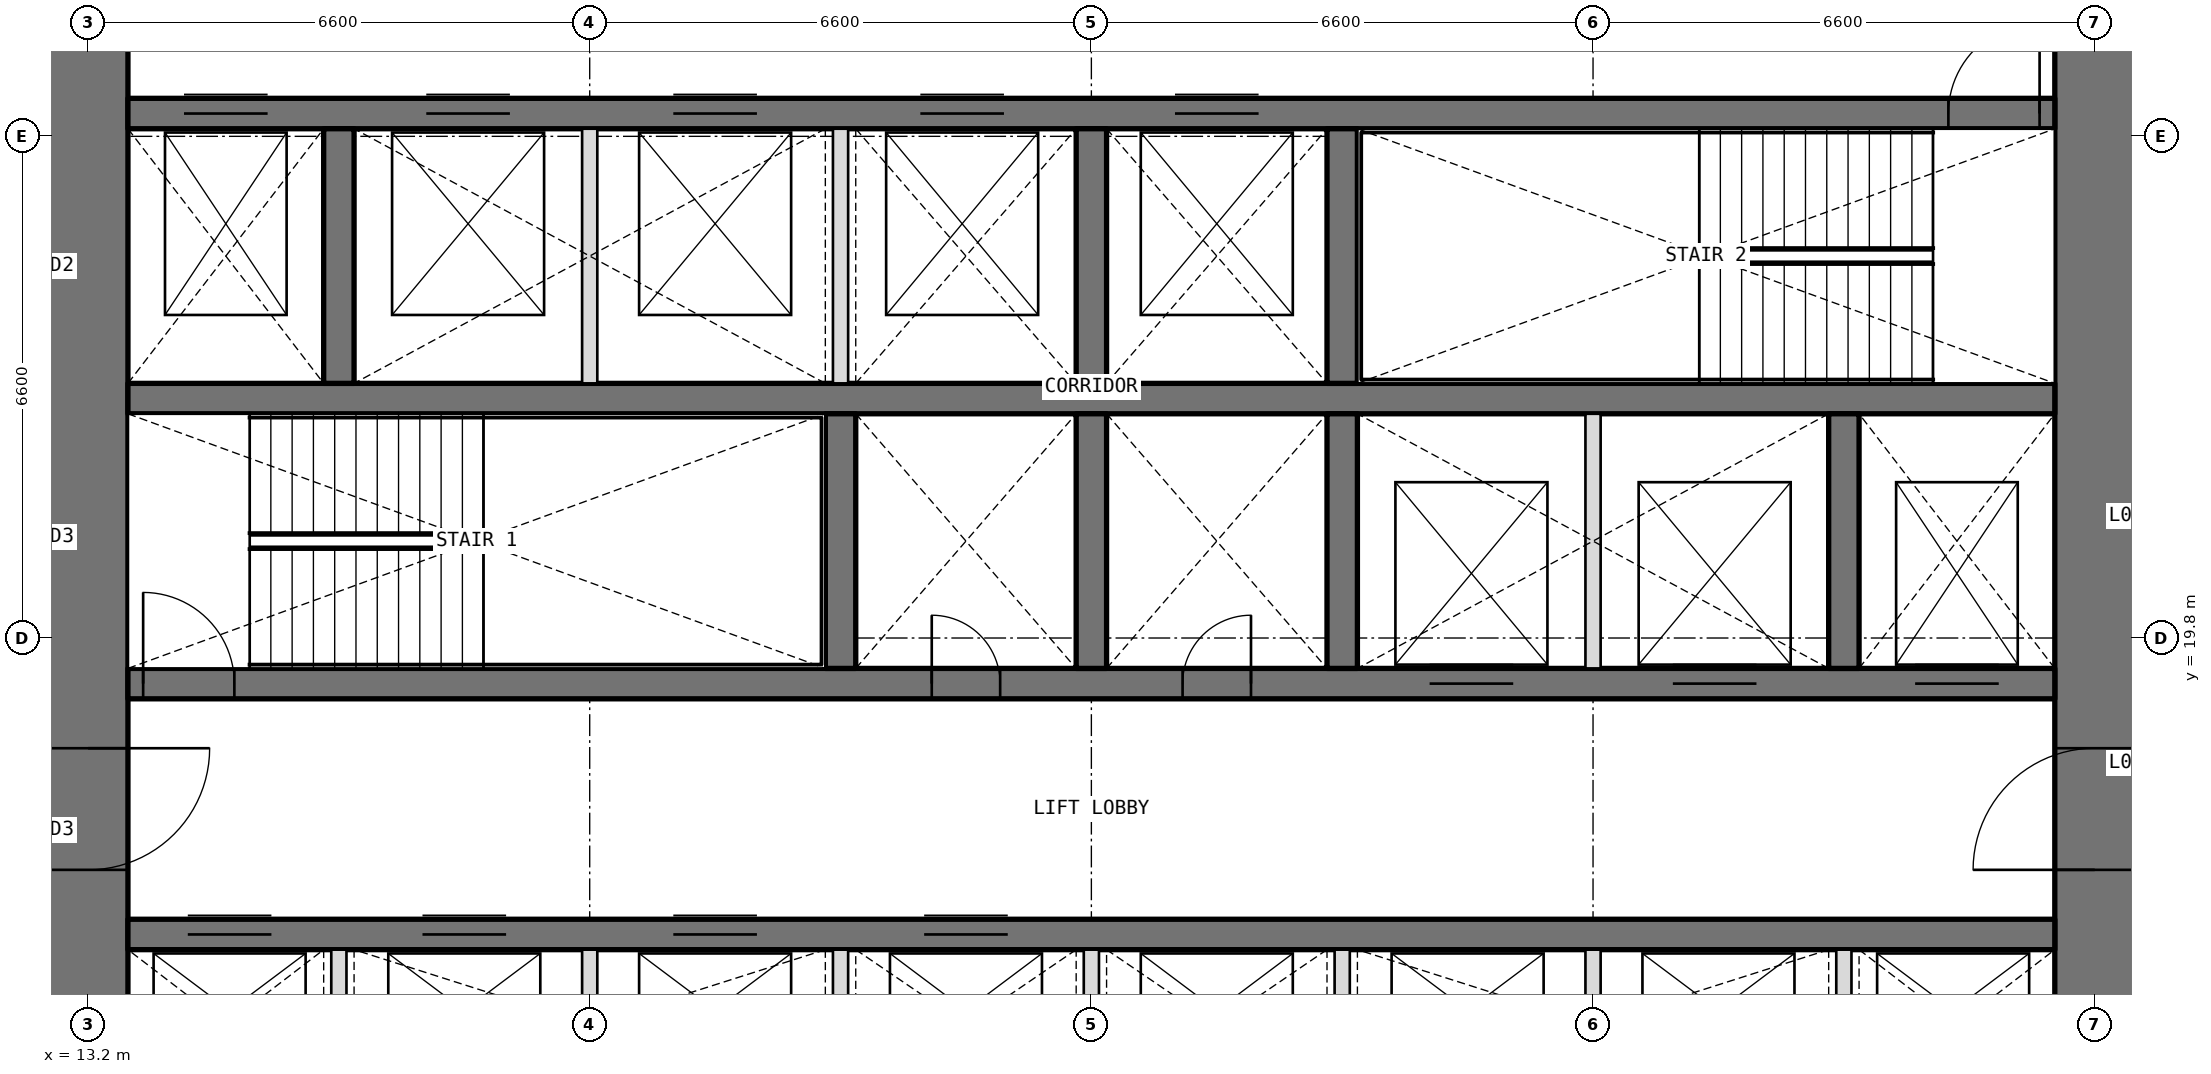
"""IFC4 building model, lengths in metres.
Left out: names, types, materials, properties, quantities, classifications, styles, units other than length and angle.
Written with IfcOpenShell. Run it as: python <this file> out.ifc"""

import sys

from ifc_helpers import new_model, si_unit, direction, frame, frame_2d, origin, place, context, subcontext, project, spatial, rectangle, extrude, element, fill, save


model = new_model("IFC4")
c1 = context("Model", 3, precision=1e-05, world=origin(), true_north=direction((0.0, 1.0)))
c2 = subcontext(c1, "Body", "Model", "MODEL_VIEW")
j1 = project(units=[si_unit("LENGTHUNIT", "METRE"), si_unit("PLANEANGLEUNIT", "RADIAN")], contexts=[c1])
p1 = place(None, origin())
s1 = spatial("IfcSite", under=j1, at=p1, CompositionType="ELEMENT")
p2 = place(p1, origin())
s2 = spatial("IfcBuilding", under=s1, at=p2, CompositionType="ELEMENT")
p3 = place(p2, frame((0.0, 0.0, 33.9)))
s3 = spatial("IfcBuildingStorey", under=s2, at=p3, CompositionType="ELEMENT", Elevation=33.9)
p4 = place(p3, frame((39.6, 13.725, 0.0), z_axis=(0.0, 0.0, 1.0), x_axis=(0.0, 1.0, 0.0)))
e1 = element("IfcWall", 1, at=p4, inside=s3, PredefinedType="SHEAR", context=c2, shape_type="SweptSolid", body=[
    extrude(rectangle(XDim=18.75, YDim=1.05, at=frame_2d((9.375, 0.0))), origin(), (0.0, 0.0, 1.0), 4.2),
])
p5 = place(p4, frame((3.025, 0.0, 0.0)))
e2 = element("IfcOpeningElement", 2, at=p5, cuts=e1, PredefinedType="OPENING", context=c2, shape_type="SweptSolid", body=[
    extrude(rectangle(XDim=1.6, YDim=2.1, at=frame_2d((0.8, 1.05))), frame((0.0, 0.535, 0.0), z_axis=(0.0, -1.0, 0.0), x_axis=(1.0, 0.0, 0.0)), (0.0, 0.0, 1.0), 1.07),
])
p6 = place(p4, frame((13.825, 0.0, 0.0)))
e3 = element("IfcOpeningElement", 3, at=p6, cuts=e1, PredefinedType="OPENING", context=c2, shape_type="SweptSolid", body=[
    extrude(rectangle(XDim=1.6, YDim=2.1, at=frame_2d((0.8, 1.05))), frame((0.0, 0.535, 0.0), z_axis=(0.0, -1.0, 0.0), x_axis=(1.0, 0.0, 0.0)), (0.0, 0.0, 1.0), 1.07),
])
p7 = place(p3, frame((13.2, 32.475, 0.0), z_axis=(0.0, 0.0, 1.0), x_axis=(0.0, -1.0, 0.0)))
e4 = element("IfcWall", 4, at=p7, inside=s3, PredefinedType="SHEAR", context=c2, shape_type="SweptSolid", body=[
    extrude(rectangle(XDim=18.75, YDim=1.05, at=frame_2d((9.375, 0.0))), origin(), (0.0, 0.0, 1.0), 4.2),
])
p8 = place(p7, frame((14.125, 0.0, 0.0)))
e5 = element("IfcOpeningElement", 5, at=p8, cuts=e4, PredefinedType="OPENING", context=c2, shape_type="SweptSolid", body=[
    extrude(rectangle(XDim=1.6, YDim=2.1, at=frame_2d((0.8, 1.05))), frame((0.0, 0.535, 0.0), z_axis=(0.0, -1.0, 0.0), x_axis=(1.0, 0.0, 0.0)), (0.0, 0.0, 1.0), 1.07),
])
p9 = place(p7, frame((3.325, 0.0, 0.0)))
e6 = element("IfcOpeningElement", 6, at=p9, cuts=e4, PredefinedType="OPENING", context=c2, shape_type="SweptSolid", body=[
    extrude(rectangle(XDim=1.6, YDim=2.1, at=frame_2d((0.8, 1.05))), frame((0.0, 0.535, 0.0), z_axis=(0.0, -1.0, 0.0), x_axis=(1.0, 0.0, 0.0)), (0.0, 0.0, 1.0), 1.07),
])
p10 = place(p3, frame((13.725, 15.9, 0.0), z_axis=(0.0, 0.0, 1.0), x_axis=(1.0, 0.0, 0.0)))
e7 = element("IfcWall", 7, at=p10, inside=s3, PredefinedType="SHEAR", context=c2, shape_type="SweptSolid", body=[
    extrude(rectangle(XDim=25.35, YDim=0.4, at=frame_2d((12.675, 0.0))), origin(), (0.0, 0.0, 1.0), 4.2),
])
p11 = place(p10, frame((0.788, 0.0, 0.0)))
e8 = element("IfcOpeningElement", 8, at=p11, cuts=e7, PredefinedType="OPENING", context=c2, shape_type="SweptSolid", body=[
    extrude(rectangle(XDim=1.1, YDim=2.1, at=frame_2d((0.55, 1.05))), frame((0.0, 0.21, 0.0), z_axis=(0.0, -1.0, 0.0), x_axis=(1.0, 0.0, 0.0)), (0.0, 0.0, 1.0), 0.42),
])
p12 = place(p10, frame((3.875, 0.0, 0.0)))
e9 = element("IfcOpeningElement", 9, at=p12, cuts=e7, PredefinedType="OPENING", context=c2, shape_type="SweptSolid", body=[
    extrude(rectangle(XDim=1.1, YDim=2.1, at=frame_2d((0.55, 1.05))), frame((0.0, 0.21, 0.0), z_axis=(0.0, -1.0, 0.0), x_axis=(1.0, 0.0, 0.0)), (0.0, 0.0, 1.0), 0.42),
])
p13 = place(p10, frame((7.175, 0.0, 0.0)))
e10 = element("IfcOpeningElement", 10, at=p13, cuts=e7, PredefinedType="OPENING", context=c2, shape_type="SweptSolid", body=[
    extrude(rectangle(XDim=1.1, YDim=2.1, at=frame_2d((0.55, 1.05))), frame((0.0, 0.21, 0.0), z_axis=(0.0, -1.0, 0.0), x_axis=(1.0, 0.0, 0.0)), (0.0, 0.0, 1.0), 0.42),
])
p14 = place(p10, frame((10.475, 0.0, 0.0)))
e11 = element("IfcOpeningElement", 11, at=p14, cuts=e7, PredefinedType="OPENING", context=c2, shape_type="SweptSolid", body=[
    extrude(rectangle(XDim=1.1, YDim=2.1, at=frame_2d((0.55, 1.05))), frame((0.0, 0.21, 0.0), z_axis=(0.0, -1.0, 0.0), x_axis=(1.0, 0.0, 0.0)), (0.0, 0.0, 1.0), 0.42),
])
p15 = place(p3, frame((13.725, 19.2, 0.0), z_axis=(0.0, 0.0, 1.0), x_axis=(1.0, 0.0, 0.0)))
e12 = element("IfcWall", 12, at=p15, inside=s3, PredefinedType="SHEAR", context=c2, shape_type="SweptSolid", body=[
    extrude(rectangle(XDim=25.35, YDim=0.4, at=frame_2d((12.675, 0.0))), origin(), (0.0, 0.0, 1.0), 4.2),
])
p16 = place(p15, frame((10.575, 0.0, 0.0)))
e13 = element("IfcOpeningElement", 13, at=p16, cuts=e12, PredefinedType="OPENING", context=c2, shape_type="SweptSolid", body=[
    extrude(rectangle(XDim=0.9, YDim=2.1, at=frame_2d((0.45, 1.05))), frame((0.0, 0.21, 0.0), z_axis=(0.0, -1.0, 0.0), x_axis=(1.0, 0.0, 0.0)), (0.0, 0.0, 1.0), 0.42),
])
p17 = place(p15, frame((13.875, 0.0, 0.0)))
e14 = element("IfcOpeningElement", 14, at=p17, cuts=e12, PredefinedType="OPENING", context=c2, shape_type="SweptSolid", body=[
    extrude(rectangle(XDim=0.9, YDim=2.1, at=frame_2d((0.45, 1.05))), frame((0.0, 0.21, 0.0), z_axis=(0.0, -1.0, 0.0), x_axis=(1.0, 0.0, 0.0)), (0.0, 0.0, 1.0), 0.42),
])
p18 = place(p15, frame((0.2, 0.0, 0.0)))
e15 = element("IfcOpeningElement", 15, at=p18, cuts=e12, PredefinedType="OPENING", context=c2, shape_type="SweptSolid", body=[
    extrude(rectangle(XDim=1.2, YDim=2.1, at=frame_2d((0.6, 1.05))), frame((0.0, 0.21, 0.0), z_axis=(0.0, -1.0, 0.0), x_axis=(1.0, 0.0, 0.0)), (0.0, 0.0, 1.0), 0.42),
])
p19 = place(p15, frame((23.512, 0.0, 0.0)))
e16 = element("IfcOpeningElement", 16, at=p19, cuts=e12, PredefinedType="OPENING", context=c2, shape_type="SweptSolid", body=[
    extrude(rectangle(XDim=1.1, YDim=2.1, at=frame_2d((0.55, 1.05))), frame((0.0, 0.21, 0.0), z_axis=(0.0, -1.0, 0.0), x_axis=(1.0, 0.0, 0.0)), (0.0, 0.0, 1.0), 0.42),
])
p20 = place(p15, frame((17.125, 0.0, 0.0)))
e17 = element("IfcOpeningElement", 17, at=p20, cuts=e12, PredefinedType="OPENING", context=c2, shape_type="SweptSolid", body=[
    extrude(rectangle(XDim=1.1, YDim=2.1, at=frame_2d((0.55, 1.05))), frame((0.0, 0.21, 0.0), z_axis=(0.0, -1.0, 0.0), x_axis=(1.0, 0.0, 0.0)), (0.0, 0.0, 1.0), 0.42),
])
p21 = place(p15, frame((20.325, 0.0, 0.0)))
e18 = element("IfcOpeningElement", 18, at=p21, cuts=e12, PredefinedType="OPENING", context=c2, shape_type="SweptSolid", body=[
    extrude(rectangle(XDim=1.1, YDim=2.1, at=frame_2d((0.55, 1.05))), frame((0.0, 0.21, 0.0), z_axis=(0.0, -1.0, 0.0), x_axis=(1.0, 0.0, 0.0)), (0.0, 0.0, 1.0), 0.42),
])
p22 = place(p3, frame((13.725, 22.95, 0.0), z_axis=(0.0, 0.0, 1.0), x_axis=(1.0, 0.0, 0.0)))
e19 = element("IfcWall", 19, at=p22, inside=s3, PredefinedType="SHEAR", context=c2, shape_type="SweptSolid", body=[
    extrude(rectangle(XDim=25.35, YDim=0.4, at=frame_2d((12.675, 0.0))), origin(), (0.0, 0.0, 1.0), 4.2),
])
p23 = place(p3, frame((13.725, 26.7, 0.0), z_axis=(0.0, 0.0, 1.0), x_axis=(1.0, 0.0, 0.0)))
e20 = element("IfcWall", 20, at=p23, inside=s3, PredefinedType="SHEAR", context=c2, shape_type="SweptSolid", body=[
    extrude(rectangle(XDim=25.35, YDim=0.4, at=frame_2d((12.675, 0.0))), origin(), (0.0, 0.0, 1.0), 4.2),
])
p24 = place(p23, frame((23.95, 0.0, 0.0)))
e21 = element("IfcOpeningElement", 21, at=p24, cuts=e20, PredefinedType="OPENING", context=c2, shape_type="SweptSolid", body=[
    extrude(rectangle(XDim=1.2, YDim=2.1, at=frame_2d((0.6, 1.05))), frame((0.0, 0.21, 0.0), z_axis=(0.0, -1.0, 0.0), x_axis=(1.0, 0.0, 0.0)), (0.0, 0.0, 1.0), 0.42),
])
p25 = place(p23, frame((0.738, 0.0, 0.0)))
e22 = element("IfcOpeningElement", 22, at=p25, cuts=e20, PredefinedType="OPENING", context=c2, shape_type="SweptSolid", body=[
    extrude(rectangle(XDim=1.1, YDim=2.1, at=frame_2d((0.55, 1.05))), frame((0.0, 0.21, 0.0), z_axis=(0.0, -1.0, 0.0), x_axis=(1.0, 0.0, 0.0)), (0.0, 0.0, 1.0), 0.42),
])
p26 = place(p23, frame((3.925, 0.0, 0.0)))
e23 = element("IfcOpeningElement", 23, at=p26, cuts=e20, PredefinedType="OPENING", context=c2, shape_type="SweptSolid", body=[
    extrude(rectangle(XDim=1.1, YDim=2.1, at=frame_2d((0.55, 1.05))), frame((0.0, 0.21, 0.0), z_axis=(0.0, -1.0, 0.0), x_axis=(1.0, 0.0, 0.0)), (0.0, 0.0, 1.0), 0.42),
])
p27 = place(p23, frame((7.175, 0.0, 0.0)))
e24 = element("IfcOpeningElement", 24, at=p27, cuts=e20, PredefinedType="OPENING", context=c2, shape_type="SweptSolid", body=[
    extrude(rectangle(XDim=1.1, YDim=2.1, at=frame_2d((0.55, 1.05))), frame((0.0, 0.21, 0.0), z_axis=(0.0, -1.0, 0.0), x_axis=(1.0, 0.0, 0.0)), (0.0, 0.0, 1.0), 0.42),
])
p28 = place(p23, frame((10.425, 0.0, 0.0)))
e25 = element("IfcOpeningElement", 25, at=p28, cuts=e20, PredefinedType="OPENING", context=c2, shape_type="SweptSolid", body=[
    extrude(rectangle(XDim=1.1, YDim=2.1, at=frame_2d((0.55, 1.05))), frame((0.0, 0.21, 0.0), z_axis=(0.0, -1.0, 0.0), x_axis=(1.0, 0.0, 0.0)), (0.0, 0.0, 1.0), 0.42),
])
p29 = place(p23, frame((13.775, 0.0, 0.0)))
e26 = element("IfcOpeningElement", 26, at=p29, cuts=e20, PredefinedType="OPENING", context=c2, shape_type="SweptSolid", body=[
    extrude(rectangle(XDim=1.1, YDim=2.1, at=frame_2d((0.55, 1.05))), frame((0.0, 0.21, 0.0), z_axis=(0.0, -1.0, 0.0), x_axis=(1.0, 0.0, 0.0)), (0.0, 0.0, 1.0), 0.42),
])
for number, where, z_axis, x_axis in (
    (27, (23.1, 19.4, 0.0), (0.0, 0.0, 1.0), (0.0, 1.0, 0.0)),
    (28, (26.4, 19.4, 0.0), (0.0, 0.0, 1.0), (0.0, 1.0, 0.0)),
    (29, (29.7, 19.4, 0.0), (0.0, 0.0, 1.0), (0.0, 1.0, 0.0)),
    (30, (36.3, 19.4, 0.0), (0.0, 0.0, 1.0), (0.0, 1.0, 0.0)),
    (31, (16.5, 23.15, 0.0), (0.0, 0.0, 1.0), (0.0, 1.0, 0.0)),
    (32, (26.4, 23.15, 0.0), (0.0, 0.0, 1.0), (0.0, 1.0, 0.0)),
    (33, (29.7, 23.15, 0.0), (0.0, 0.0, 1.0), (0.0, 1.0, 0.0)),
):
    element("IfcWall", number, at=place(p3, frame(where, z_axis=z_axis, x_axis=x_axis)), inside=s3, PredefinedType="SHEAR", context=c2, shape_type="SweptSolid", body=[
        extrude(rectangle(XDim=3.35, YDim=0.4, at=frame_2d((1.675, 0.0))), origin(), (0.0, 0.0, 1.0), 4.2),
    ])
for number, where, z_axis, x_axis in (
    (34, (16.5, 13.725, 0.0), (0.0, 0.0, 1.0), (0.0, 1.0, 0.0)),
    (35, (19.8, 13.725, 0.0), (0.0, 0.0, 1.0), (0.0, 1.0, 0.0)),
    (36, (23.1, 13.725, 0.0), (0.0, 0.0, 1.0), (0.0, 1.0, 0.0)),
    (37, (26.4, 13.725, 0.0), (0.0, 0.0, 1.0), (0.0, 1.0, 0.0)),
    (38, (29.7, 13.725, 0.0), (0.0, 0.0, 1.0), (0.0, 1.0, 0.0)),
    (39, (33.0, 13.725, 0.0), (0.0, 0.0, 1.0), (0.0, 1.0, 0.0)),
    (40, (36.3, 13.725, 0.0), (0.0, 0.0, 1.0), (0.0, 1.0, 0.0)),
):
    element("IfcWall", number, at=place(p3, frame(where, z_axis=z_axis, x_axis=x_axis)), inside=s3, PredefinedType="PARTITIONING", context=c2, shape_type="SweptSolid", body=[
        extrude(rectangle(XDim=1.975, YDim=0.2, at=frame_2d((0.987, 0.0))), origin(), (0.0, 0.0, 1.0), 4.2),
    ])
for number, where, z_axis, x_axis in (
    (41, (33.0, 19.4, 0.0), (0.0, 0.0, 1.0), (0.0, 1.0, 0.0)),
    (42, (19.8, 23.15, 0.0), (0.0, 0.0, 1.0), (0.0, 1.0, 0.0)),
    (43, (23.1, 23.15, 0.0), (0.0, 0.0, 1.0), (0.0, 1.0, 0.0)),
):
    element("IfcWall", number, at=place(p3, frame(where, z_axis=z_axis, x_axis=x_axis)), inside=s3, PredefinedType="PARTITIONING", context=c2, shape_type="SweptSolid", body=[
        extrude(rectangle(XDim=3.35, YDim=0.2, at=frame_2d((1.675, 0.0))), origin(), (0.0, 0.0, 1.0), 4.2),
    ])
p30 = place(p16, origin())
e44 = element("IfcDoor", 44, at=p30, inside=s3, OperationType="SINGLE_SWING_LEFT", PredefinedType="DOOR", context=c2, shape_type="SweptSolid", body=[
    extrude(rectangle(XDim=0.9, YDim=2.1, at=frame_2d((0.45, 1.05))), frame((0.0, 0.025, 0.0), z_axis=(0.0, -1.0, 0.0), x_axis=(1.0, 0.0, 0.0)), (0.0, 0.0, 1.0), 0.05),
])
fill(e13, e44)
p31 = place(p17, origin())
e45 = element("IfcDoor", 45, at=p31, inside=s3, OperationType="SINGLE_SWING_RIGHT", PredefinedType="DOOR", context=c2, shape_type="SweptSolid", body=[
    extrude(rectangle(XDim=0.9, YDim=2.1, at=frame_2d((0.45, 1.05))), frame((0.0, 0.025, 0.0), z_axis=(0.0, -1.0, 0.0), x_axis=(1.0, 0.0, 0.0)), (0.0, 0.0, 1.0), 0.05),
])
fill(e14, e45)
p32 = place(p18, origin())
e46 = element("IfcDoor", 46, at=p32, inside=s3, OperationType="SINGLE_SWING_LEFT", PredefinedType="DOOR", context=c2, shape_type="SweptSolid", body=[
    extrude(rectangle(XDim=1.2, YDim=2.1, at=frame_2d((0.6, 1.05))), frame((0.0, 0.025, 0.0), z_axis=(0.0, -1.0, 0.0), x_axis=(1.0, 0.0, 0.0)), (0.0, 0.0, 1.0), 0.05),
])
fill(e15, e46)
p33 = place(p24, origin())
e47 = element("IfcDoor", 47, at=p33, inside=s3, OperationType="SINGLE_SWING_RIGHT", PredefinedType="DOOR", context=c2, shape_type="SweptSolid", body=[
    extrude(rectangle(XDim=1.2, YDim=2.1, at=frame_2d((0.6, 1.05))), frame((0.0, 0.025, 0.0), z_axis=(0.0, -1.0, 0.0), x_axis=(1.0, 0.0, 0.0)), (0.0, 0.0, 1.0), 0.05),
])
fill(e21, e47)
p34 = place(p8, origin())
e48 = element("IfcDoor", 48, at=p34, inside=s3, OperationType="DOUBLE_DOOR_DOUBLE_SWING", PredefinedType="DOOR", context=c2, shape_type="SweptSolid", body=[
    extrude(rectangle(XDim=1.6, YDim=2.1, at=frame_2d((0.8, 1.05))), frame((0.0, 0.025, 0.0), z_axis=(0.0, -1.0, 0.0), x_axis=(1.0, 0.0, 0.0)), (0.0, 0.0, 1.0), 0.05),
])
fill(e5, e48)
p35 = place(p5, origin())
e49 = element("IfcDoor", 49, at=p35, inside=s3, OperationType="DOUBLE_DOOR_DOUBLE_SWING", PredefinedType="DOOR", context=c2, shape_type="SweptSolid", body=[
    extrude(rectangle(XDim=1.6, YDim=2.1, at=frame_2d((0.8, 1.05))), frame((0.0, 0.025, 0.0), z_axis=(0.0, -1.0, 0.0), x_axis=(1.0, 0.0, 0.0)), (0.0, 0.0, 1.0), 0.05),
])
fill(e2, e49)
p36 = place(p11, origin())
e50 = element("IfcDoor", 50, at=p36, inside=s3, OperationType="DOUBLE_DOOR_SLIDING", PredefinedType="DOOR", context=c2, shape_type="SweptSolid", body=[
    extrude(rectangle(XDim=1.1, YDim=2.1, at=frame_2d((0.55, 1.05))), frame((0.0, 0.025, 0.0), z_axis=(0.0, -1.0, 0.0), x_axis=(1.0, 0.0, 0.0)), (0.0, 0.0, 1.0), 0.05),
])
fill(e8, e50)
p37 = place(p12, origin())
e51 = element("IfcDoor", 51, at=p37, inside=s3, OperationType="DOUBLE_DOOR_SLIDING", PredefinedType="DOOR", context=c2, shape_type="SweptSolid", body=[
    extrude(rectangle(XDim=1.1, YDim=2.1, at=frame_2d((0.55, 1.05))), frame((0.0, 0.025, 0.0), z_axis=(0.0, -1.0, 0.0), x_axis=(1.0, 0.0, 0.0)), (0.0, 0.0, 1.0), 0.05),
])
fill(e9, e51)
p38 = place(p13, origin())
e52 = element("IfcDoor", 52, at=p38, inside=s3, OperationType="DOUBLE_DOOR_SLIDING", PredefinedType="DOOR", context=c2, shape_type="SweptSolid", body=[
    extrude(rectangle(XDim=1.1, YDim=2.1, at=frame_2d((0.55, 1.05))), frame((0.0, 0.025, 0.0), z_axis=(0.0, -1.0, 0.0), x_axis=(1.0, 0.0, 0.0)), (0.0, 0.0, 1.0), 0.05),
])
fill(e10, e52)
p39 = place(p14, origin())
e53 = element("IfcDoor", 53, at=p39, inside=s3, OperationType="DOUBLE_DOOR_SLIDING", PredefinedType="DOOR", context=c2, shape_type="SweptSolid", body=[
    extrude(rectangle(XDim=1.1, YDim=2.1, at=frame_2d((0.55, 1.05))), frame((0.0, 0.025, 0.0), z_axis=(0.0, -1.0, 0.0), x_axis=(1.0, 0.0, 0.0)), (0.0, 0.0, 1.0), 0.05),
])
fill(e11, e53)
p40 = place(p25, origin())
e54 = element("IfcDoor", 54, at=p40, inside=s3, OperationType="DOUBLE_DOOR_SLIDING", PredefinedType="DOOR", context=c2, shape_type="SweptSolid", body=[
    extrude(rectangle(XDim=1.1, YDim=2.1, at=frame_2d((0.55, 1.05))), frame((0.0, 0.025, 0.0), z_axis=(0.0, -1.0, 0.0), x_axis=(1.0, 0.0, 0.0)), (0.0, 0.0, 1.0), 0.05),
])
fill(e22, e54)
p41 = place(p19, origin())
e55 = element("IfcDoor", 55, at=p41, inside=s3, OperationType="DOUBLE_DOOR_SLIDING", PredefinedType="DOOR", context=c2, shape_type="SweptSolid", body=[
    extrude(rectangle(XDim=1.1, YDim=2.1, at=frame_2d((0.55, 1.05))), frame((0.0, 0.025, 0.0), z_axis=(0.0, -1.0, 0.0), x_axis=(1.0, 0.0, 0.0)), (0.0, 0.0, 1.0), 0.05),
])
fill(e16, e55)
p42 = place(p20, origin())
e56 = element("IfcDoor", 56, at=p42, inside=s3, OperationType="DOUBLE_DOOR_SLIDING", PredefinedType="DOOR", context=c2, shape_type="SweptSolid", body=[
    extrude(rectangle(XDim=1.1, YDim=2.1, at=frame_2d((0.55, 1.05))), frame((0.0, 0.025, 0.0), z_axis=(0.0, -1.0, 0.0), x_axis=(1.0, 0.0, 0.0)), (0.0, 0.0, 1.0), 0.05),
])
fill(e17, e56)
p43 = place(p21, origin())
e57 = element("IfcDoor", 57, at=p43, inside=s3, OperationType="DOUBLE_DOOR_SLIDING", PredefinedType="DOOR", context=c2, shape_type="SweptSolid", body=[
    extrude(rectangle(XDim=1.1, YDim=2.1, at=frame_2d((0.55, 1.05))), frame((0.0, 0.025, 0.0), z_axis=(0.0, -1.0, 0.0), x_axis=(1.0, 0.0, 0.0)), (0.0, 0.0, 1.0), 0.05),
])
fill(e18, e57)
p44 = place(p26, origin())
e58 = element("IfcDoor", 58, at=p44, inside=s3, OperationType="DOUBLE_DOOR_SLIDING", PredefinedType="DOOR", context=c2, shape_type="SweptSolid", body=[
    extrude(rectangle(XDim=1.1, YDim=2.1, at=frame_2d((0.55, 1.05))), frame((0.0, 0.025, 0.0), z_axis=(0.0, -1.0, 0.0), x_axis=(1.0, 0.0, 0.0)), (0.0, 0.0, 1.0), 0.05),
])
fill(e23, e58)
p45 = place(p27, origin())
e59 = element("IfcDoor", 59, at=p45, inside=s3, OperationType="DOUBLE_DOOR_SLIDING", PredefinedType="DOOR", context=c2, shape_type="SweptSolid", body=[
    extrude(rectangle(XDim=1.1, YDim=2.1, at=frame_2d((0.55, 1.05))), frame((0.0, 0.025, 0.0), z_axis=(0.0, -1.0, 0.0), x_axis=(1.0, 0.0, 0.0)), (0.0, 0.0, 1.0), 0.05),
])
fill(e24, e59)
p46 = place(p28, origin())
e60 = element("IfcDoor", 60, at=p46, inside=s3, OperationType="DOUBLE_DOOR_SLIDING", PredefinedType="DOOR", context=c2, shape_type="SweptSolid", body=[
    extrude(rectangle(XDim=1.1, YDim=2.1, at=frame_2d((0.55, 1.05))), frame((0.0, 0.025, 0.0), z_axis=(0.0, -1.0, 0.0), x_axis=(1.0, 0.0, 0.0)), (0.0, 0.0, 1.0), 0.05),
])
fill(e25, e60)
p47 = place(p29, origin())
e61 = element("IfcDoor", 61, at=p47, inside=s3, OperationType="DOUBLE_DOOR_SLIDING", PredefinedType="DOOR", context=c2, shape_type="SweptSolid", body=[
    extrude(rectangle(XDim=1.1, YDim=2.1, at=frame_2d((0.55, 1.05))), frame((0.0, 0.025, 0.0), z_axis=(0.0, -1.0, 0.0), x_axis=(1.0, 0.0, 0.0)), (0.0, 0.0, 1.0), 0.05),
])
fill(e26, e61)
save(model, sys.argv[1])
